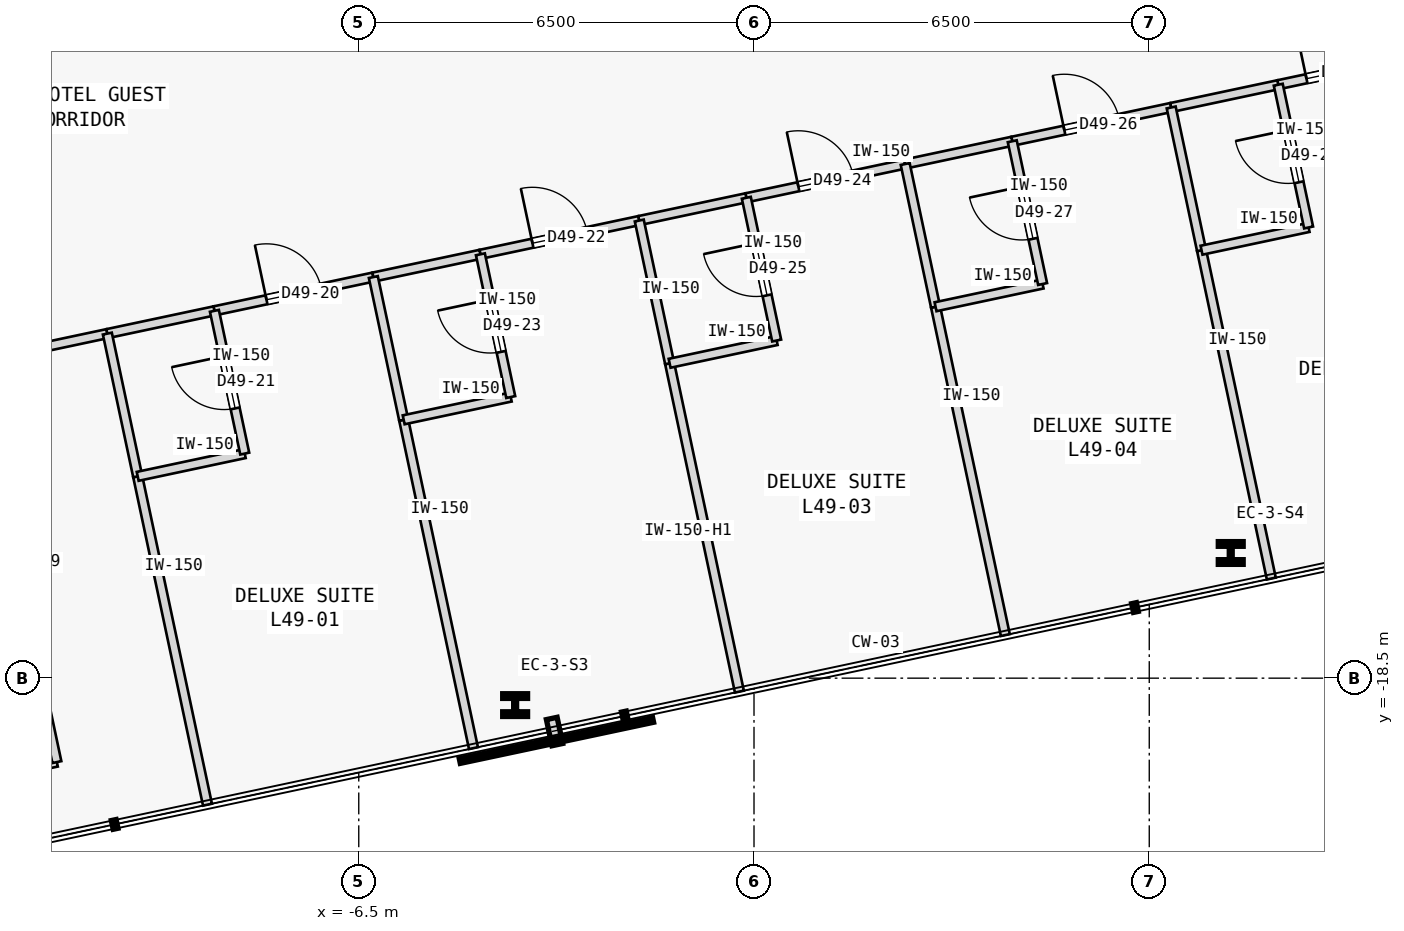
"""IFC4 building model, lengths in metres.
Left out: names, types, materials, properties, quantities, classifications, styles, units other than length and angle.
Written with IfcOpenShell. Run it as: python <this file> out.ifc"""

import sys

from ifc_helpers import new_model, si_unit, direction, frame, frame_2d, origin, origin_2d, place, context, subcontext, project, spatial, rectangle, i_section, extrude, element, fill, save


model = new_model("IFC4")
c1 = context("Model", 3, precision=1e-05, world=origin(), true_north=direction((0.0, 1.0)))
c2 = subcontext(c1, "Body", "Model", "MODEL_VIEW")
j1 = project(units=[si_unit("LENGTHUNIT", "METRE"), si_unit("PLANEANGLEUNIT", "RADIAN")], contexts=[c1])
p1 = place(None, origin())
s1 = spatial("IfcSite", under=j1, at=p1, CompositionType="ELEMENT")
p2 = place(p1, origin())
s2 = spatial("IfcBuilding", under=s1, at=p2, CompositionType="ELEMENT")
p3 = place(p2, frame((0.0, 0.0, 188.8)))
s3 = spatial("IfcBuildingStorey", under=s2, at=p3, CompositionType="ELEMENT", Elevation=188.8)
for number, where, z_axis, x_axis in (
    (1, (-3.928, -18.943, 0.0), (0.0, 0.0, 1.0), (1.0, 0.0, 0.0)),
    (2, (7.84, -16.441, 0.0), (0.0, 0.0, 1.0), (1.0, 0.0, 0.0)),
):
    element("IfcColumn", number, at=place(p3, frame(where, z_axis=z_axis, x_axis=x_axis)), inside=s3, PredefinedType="COLUMN", context=c2, shape_type="SweptSolid", body=[
        extrude(i_section(OverallWidth=0.409, OverallDepth=0.374, WebThickness=0.048, FlangeThickness=0.077, FilletRadius=0.015, at=origin_2d()), origin(), (0.0, 0.0, 1.0), 3.4),
    ])
p4 = place(p3, frame((-13.274, -20.265, 0.0), z_axis=(0.0, 0.0, 1.0), x_axis=(0.978160192495, 0.207852442415, 0.0)))
e3 = element("IfcWall", 3, at=p4, inside=s3, PredefinedType="PARTITIONING", context=c2, shape_type="SweptSolid", body=[
    extrude(rectangle(XDim=1.85, YDim=0.15, at=frame_2d((0.925, 0.0))), origin(), (0.0, 0.0, 1.0), 3.175),
])
p5 = place(p3, frame((-11.465, -19.88, 0.0), z_axis=(0.0, 0.0, 1.0), x_axis=(-0.207916109912, 0.978146661416, 0.0)))
e4 = element("IfcWall", 4, at=p5, inside=s3, PredefinedType="PARTITIONING", context=c2, shape_type="SweptSolid", body=[
    extrude(rectangle(XDim=6.72, YDim=0.15, at=frame_2d((3.36, 0.0))), origin(), (0.0, 0.0, 1.0), 3.175),
])
p6 = place(p5, frame((2.9, 0.0, 0.0)))
e5 = element("IfcOpeningElement", 5, at=p6, cuts=e4, PredefinedType="OPENING", context=c2, shape_type="SweptSolid", body=[
    extrude(rectangle(XDim=0.92, YDim=2.15, at=frame_2d((0.46, 1.075))), frame((0.0, 0.085, 0.0), z_axis=(0.0, -1.0, 0.0), x_axis=(1.0, 0.0, 0.0)), (0.0, 0.0, 1.0), 0.17),
])
p7 = place(p3, frame((-12.862, -13.307, 0.0), z_axis=(0.0, 0.0, 1.0), x_axis=(0.978150947903, 0.207895943, 0.0)))
e6 = element("IfcWall", 6, at=p7, inside=s3, PredefinedType="PARTITIONING", context=c2, shape_type="SweptSolid", body=[
    extrude(rectangle(XDim=2.277, YDim=0.15, at=frame_2d((1.139, 0.0))), origin(), (0.0, 0.0, 1.0), 3.175),
])
p8 = place(p3, frame((-8.874, -12.459, 0.0), z_axis=(0.0, 0.0, 1.0), x_axis=(0.978136784457, 0.207962570894, 0.0)))
e7 = element("IfcWall", 7, at=p8, inside=s3, PredefinedType="PARTITIONING", context=c2, shape_type="SweptSolid", body=[
    extrude(rectangle(XDim=2.672, YDim=0.15, at=frame_2d((1.336, 0.0))), origin(), (0.0, 0.0, 1.0), 3.175),
])
p9 = place(p8, frame((0.876, 0.0, 0.0)))
e8 = element("IfcOpeningElement", 8, at=p9, cuts=e7, PredefinedType="OPENING", context=c2, shape_type="SweptSolid", body=[
    extrude(rectangle(XDim=0.92, YDim=2.15, at=frame_2d((0.46, 1.075))), frame((0.0, 0.085, 0.0), z_axis=(0.0, -1.0, 0.0), x_axis=(1.0, 0.0, 0.0)), (0.0, 0.0, 1.0), 0.17),
])
p10 = place(p3, frame((-10.635, -12.834, 0.0), z_axis=(0.0, 0.0, 1.0), x_axis=(0.978146440129, 0.207917150959, 0.0)))
e9 = element("IfcWall", 9, at=p10, inside=s3, PredefinedType="PARTITIONING", context=c2, shape_type="SweptSolid", body=[
    extrude(rectangle(XDim=1.8, YDim=0.15, at=frame_2d((0.9, 0.0))), origin(), (0.0, 0.0, 1.0), 3.175),
])
p11 = place(p3, frame((-4.5, -11.53, 0.0), z_axis=(0.0, 0.0, 1.0), x_axis=(0.978139565144, 0.207949491702, 0.0)))
e10 = element("IfcWall", 10, at=p11, inside=s3, PredefinedType="PARTITIONING", context=c2, shape_type="SweptSolid", body=[
    extrude(rectangle(XDim=2.671, YDim=0.15, at=frame_2d((1.335, 0.0))), origin(), (0.0, 0.0, 1.0), 3.175),
])
p12 = place(p11, frame((0.875, 0.0, 0.0)))
e11 = element("IfcOpeningElement", 11, at=p12, cuts=e10, PredefinedType="OPENING", context=c2, shape_type="SweptSolid", body=[
    extrude(rectangle(XDim=0.92, YDim=2.15, at=frame_2d((0.46, 1.075))), frame((0.0, 0.085, 0.0), z_axis=(0.0, -1.0, 0.0), x_axis=(1.0, 0.0, 0.0)), (0.0, 0.0, 1.0), 0.17),
])
p13 = place(p3, frame((-6.26, -11.904, 0.0), z_axis=(0.0, 0.0, 1.0), x_axis=(0.978174015353, 0.207787380965, 0.0)))
e12 = element("IfcWall", 12, at=p13, inside=s3, PredefinedType="PARTITIONING", context=c2, shape_type="SweptSolid", body=[
    extrude(rectangle(XDim=1.8, YDim=0.15, at=frame_2d((0.9, 0.0))), origin(), (0.0, 0.0, 1.0), 3.175),
])
p14 = place(p3, frame((-0.126, -10.6, 0.0), z_axis=(0.0, 0.0, 1.0), x_axis=(0.978158153975, 0.207862035524, 0.0)))
e13 = element("IfcWall", 13, at=p14, inside=s3, PredefinedType="PARTITIONING", context=c2, shape_type="SweptSolid", body=[
    extrude(rectangle(XDim=2.671, YDim=0.15, at=frame_2d((1.335, 0.0))), origin(), (0.0, 0.0, 1.0), 3.175),
])
p15 = place(p14, frame((0.875, 0.0, 0.0)))
e14 = element("IfcOpeningElement", 14, at=p15, cuts=e13, PredefinedType="OPENING", context=c2, shape_type="SweptSolid", body=[
    extrude(rectangle(XDim=0.92, YDim=2.15, at=frame_2d((0.46, 1.075))), frame((0.0, 0.085, 0.0), z_axis=(0.0, -1.0, 0.0), x_axis=(1.0, 0.0, 0.0)), (0.0, 0.0, 1.0), 0.17),
])
p16 = place(p3, frame((-1.887, -10.974, 0.0), z_axis=(0.0, 0.0, 1.0), x_axis=(0.978146440129, 0.207917150959, 0.0)))
e15 = element("IfcWall", 15, at=p16, inside=s3, PredefinedType="PARTITIONING", context=c2, shape_type="SweptSolid", body=[
    extrude(rectangle(XDim=1.8, YDim=0.15, at=frame_2d((0.9, 0.0))), origin(), (0.0, 0.0, 1.0), 3.175),
])
p17 = place(p3, frame((4.247, -9.67, 0.0), z_axis=(0.0, 0.0, 1.0), x_axis=(0.978155367406, 0.207875148141, 0.0)))
e16 = element("IfcWall", 16, at=p17, inside=s3, PredefinedType="PARTITIONING", context=c2, shape_type="SweptSolid", body=[
    extrude(rectangle(XDim=2.672, YDim=0.15, at=frame_2d((1.336, 0.0))), origin(), (0.0, 0.0, 1.0), 3.175),
])
p18 = place(p17, frame((0.876, 0.0, 0.0)))
e17 = element("IfcOpeningElement", 17, at=p18, cuts=e16, PredefinedType="OPENING", context=c2, shape_type="SweptSolid", body=[
    extrude(rectangle(XDim=0.92, YDim=2.15, at=frame_2d((0.46, 1.075))), frame((0.0, 0.085, 0.0), z_axis=(0.0, -1.0, 0.0), x_axis=(1.0, 0.0, 0.0)), (0.0, 0.0, 1.0), 0.17),
])
p19 = place(p3, frame((2.486, -10.045, 0.0), z_axis=(0.0, 0.0, 1.0), x_axis=(0.978118849246, 0.208046909975, 0.0)))
e18 = element("IfcWall", 18, at=p19, inside=s3, PredefinedType="PARTITIONING", context=c2, shape_type="SweptSolid", body=[
    extrude(rectangle(XDim=1.8, YDim=0.15, at=frame_2d((0.9, 0.0))), origin(), (0.0, 0.0, 1.0), 3.175),
])
p20 = place(p3, frame((8.621, -8.741, 0.0), z_axis=(0.0, 0.0, 1.0), x_axis=(0.978139565144, 0.207949491702, 0.0)))
e19 = element("IfcWall", 19, at=p20, inside=s3, PredefinedType="PARTITIONING", context=c2, shape_type="SweptSolid", body=[
    extrude(rectangle(XDim=2.671, YDim=0.15, at=frame_2d((1.335, 0.0))), origin(), (0.0, 0.0, 1.0), 3.175),
])
p21 = place(p20, frame((0.475, 0.0, 0.0)))
e20 = element("IfcOpeningElement", 20, at=p21, cuts=e19, PredefinedType="OPENING", context=c2, shape_type="SweptSolid", body=[
    extrude(rectangle(XDim=0.92, YDim=2.15, at=frame_2d((0.46, 1.075))), frame((0.0, 0.085, 0.0), z_axis=(0.0, -1.0, 0.0), x_axis=(1.0, 0.0, 0.0)), (0.0, 0.0, 1.0), 0.17),
])
p22 = place(p3, frame((6.861, -9.115, 0.0), z_axis=(0.0, 0.0, 1.0), x_axis=(0.978146440129, 0.207917150959, 0.0)))
e21 = element("IfcWall", 21, at=p22, inside=s3, PredefinedType="PARTITIONING", context=c2, shape_type="SweptSolid", body=[
    extrude(rectangle(XDim=1.8, YDim=0.15, at=frame_2d((0.9, 0.0))), origin(), (0.0, 0.0, 1.0), 3.175),
])
p23 = place(p3, frame((-8.988, -20.581, 0.0), z_axis=(0.0, 0.0, 1.0), x_axis=(-0.20791588359, 0.978146709523, 0.0)))
e22 = element("IfcWall", 22, at=p23, inside=s3, PredefinedType="PARTITIONING", context=c2, shape_type="SweptSolid", body=[
    extrude(rectangle(XDim=5.52, YDim=0.15, at=frame_2d((2.76, 0.0))), origin(), (0.0, 0.0, 1.0), 3.175),
])
p24 = place(p3, frame((-10.135, -15.181, 0.0), z_axis=(0.0, 0.0, 1.0), x_axis=(-0.207937840262, 0.978142042133, 0.0)))
e23 = element("IfcWall", 23, at=p24, inside=s3, PredefinedType="PARTITIONING", context=c2, shape_type="SweptSolid", body=[
    extrude(rectangle(XDim=2.4, YDim=0.15, at=frame_2d((1.2, 0.0))), origin(), (0.0, 0.0, 1.0), 3.175),
])
p25 = place(p3, frame((-10.135, -15.181, 0.0), z_axis=(0.0, 0.0, 1.0), x_axis=(0.978140575842, 0.207944737591, 0.0)))
e24 = element("IfcWall", 24, at=p25, inside=s3, PredefinedType="PARTITIONING", context=c2, shape_type="SweptSolid", body=[
    extrude(rectangle(XDim=1.8, YDim=0.15, at=frame_2d((0.9, 0.0))), origin(), (0.0, 0.0, 1.0), 3.175),
])
p26 = place(p3, frame((-8.375, -14.807, 0.0), z_axis=(0.0, 0.0, 1.0), x_axis=(-0.207840504985, 0.978162729042, 0.0)))
e25 = element("IfcWall", 25, at=p26, inside=s3, PredefinedType="PARTITIONING", context=c2, shape_type="SweptSolid", body=[
    extrude(rectangle(XDim=2.4, YDim=0.15, at=frame_2d((1.2, 0.0))), origin(), (0.0, 0.0, 1.0), 3.175),
])
p27 = place(p26, frame((0.76, 0.0, 0.0)))
e26 = element("IfcOpeningElement", 26, at=p27, cuts=e25, PredefinedType="OPENING", context=c2, shape_type="SweptSolid", body=[
    extrude(rectangle(XDim=0.88, YDim=2.15, at=frame_2d((0.44, 1.075))), frame((0.0, 0.085, 0.0), z_axis=(0.0, -1.0, 0.0), x_axis=(1.0, 0.0, 0.0)), (0.0, 0.0, 1.0), 0.17),
])
p28 = place(p3, frame((-4.614, -19.651, 0.0), z_axis=(0.0, 0.0, 1.0), x_axis=(-0.20791588359, 0.978146709523, 0.0)))
e27 = element("IfcWall", 27, at=p28, inside=s3, PredefinedType="PARTITIONING", context=c2, shape_type="SweptSolid", body=[
    extrude(rectangle(XDim=5.52, YDim=0.15, at=frame_2d((2.76, 0.0))), origin(), (0.0, 0.0, 1.0), 3.175),
])
p29 = place(p3, frame((-5.761, -14.251, 0.0), z_axis=(0.0, 0.0, 1.0), x_axis=(-0.207917150959, 0.978146440129, 0.0)))
e28 = element("IfcWall", 28, at=p29, inside=s3, PredefinedType="PARTITIONING", context=c2, shape_type="SweptSolid", body=[
    extrude(rectangle(XDim=2.4, YDim=0.15, at=frame_2d((1.2, 0.0))), origin(), (0.0, 0.0, 1.0), 3.175),
])
p30 = place(p3, frame((-5.761, -14.251, 0.0), z_axis=(0.0, 0.0, 1.0), x_axis=(0.978146440129, 0.207917150959, 0.0)))
e29 = element("IfcWall", 29, at=p30, inside=s3, PredefinedType="PARTITIONING", context=c2, shape_type="SweptSolid", body=[
    extrude(rectangle(XDim=1.8, YDim=0.15, at=frame_2d((0.9, 0.0))), origin(), (0.0, 0.0, 1.0), 3.175),
])
p31 = place(p3, frame((-4.0, -13.877, 0.0), z_axis=(0.0, 0.0, 1.0), x_axis=(-0.207937840262, 0.978142042133, 0.0)))
e30 = element("IfcWall", 30, at=p31, inside=s3, PredefinedType="PARTITIONING", context=c2, shape_type="SweptSolid", body=[
    extrude(rectangle(XDim=2.4, YDim=0.15, at=frame_2d((1.2, 0.0))), origin(), (0.0, 0.0, 1.0), 3.175),
])
p32 = place(p31, frame((0.76, 0.0, 0.0)))
e31 = element("IfcOpeningElement", 31, at=p32, cuts=e30, PredefinedType="OPENING", context=c2, shape_type="SweptSolid", body=[
    extrude(rectangle(XDim=0.88, YDim=2.15, at=frame_2d((0.44, 1.075))), frame((0.0, 0.085, 0.0), z_axis=(0.0, -1.0, 0.0), x_axis=(1.0, 0.0, 0.0)), (0.0, 0.0, 1.0), 0.17),
])
p33 = place(p3, frame((-0.24, -18.721, 0.0), z_axis=(0.0, 0.0, 1.0), x_axis=(-0.20792487872, 0.978144797466, 0.0)))
e32 = element("IfcWall", 32, at=p33, inside=s3, PredefinedType="PARTITIONING", context=c2, shape_type="SweptSolid", body=[
    extrude(rectangle(XDim=5.52, YDim=0.15, at=frame_2d((2.76, 0.0))), origin(), (0.0, 0.0, 1.0), 2.725),
])
p34 = place(p3, frame((-1.388, -13.322, 0.0), z_axis=(0.0, 0.0, 1.0), x_axis=(-0.207917150959, 0.978146440129, 0.0)))
e33 = element("IfcWall", 33, at=p34, inside=s3, PredefinedType="PARTITIONING", context=c2, shape_type="SweptSolid", body=[
    extrude(rectangle(XDim=2.4, YDim=0.15, at=frame_2d((1.2, 0.0))), origin(), (0.0, 0.0, 1.0), 3.175),
])
p35 = place(p3, frame((-1.388, -13.322, 0.0), z_axis=(0.0, 0.0, 1.0), x_axis=(0.978118849246, 0.208046909975, 0.0)))
e34 = element("IfcWall", 34, at=p35, inside=s3, PredefinedType="PARTITIONING", context=c2, shape_type="SweptSolid", body=[
    extrude(rectangle(XDim=1.8, YDim=0.15, at=frame_2d((0.9, 0.0))), origin(), (0.0, 0.0, 1.0), 3.175),
])
p36 = place(p3, frame((0.373, -12.948, 0.0), z_axis=(0.0, 0.0, 1.0), x_axis=(-0.207937840262, 0.978142042133, 0.0)))
e35 = element("IfcWall", 35, at=p36, inside=s3, PredefinedType="PARTITIONING", context=c2, shape_type="SweptSolid", body=[
    extrude(rectangle(XDim=2.4, YDim=0.15, at=frame_2d((1.2, 0.0))), origin(), (0.0, 0.0, 1.0), 3.175),
])
p37 = place(p36, frame((0.76, 0.0, 0.0)))
e36 = element("IfcOpeningElement", 36, at=p37, cuts=e35, PredefinedType="OPENING", context=c2, shape_type="SweptSolid", body=[
    extrude(rectangle(XDim=0.88, YDim=2.15, at=frame_2d((0.44, 1.075))), frame((0.0, 0.085, 0.0), z_axis=(0.0, -1.0, 0.0), x_axis=(1.0, 0.0, 0.0)), (0.0, 0.0, 1.0), 0.17),
])
p38 = place(p3, frame((4.133, -17.792, 0.0), z_axis=(0.0, 0.0, 1.0), x_axis=(-0.20791588359, 0.978146709523, 0.0)))
e37 = element("IfcWall", 37, at=p38, inside=s3, PredefinedType="PARTITIONING", context=c2, shape_type="SweptSolid", body=[
    extrude(rectangle(XDim=5.52, YDim=0.15, at=frame_2d((2.76, 0.0))), origin(), (0.0, 0.0, 1.0), 3.175),
])
p39 = place(p3, frame((2.985, -12.392, 0.0), z_axis=(0.0, 0.0, 1.0), x_axis=(-0.207937840262, 0.978142042133, 0.0)))
e38 = element("IfcWall", 38, at=p39, inside=s3, PredefinedType="PARTITIONING", context=c2, shape_type="SweptSolid", body=[
    extrude(rectangle(XDim=2.4, YDim=0.15, at=frame_2d((1.2, 0.0))), origin(), (0.0, 0.0, 1.0), 3.175),
])
p40 = place(p3, frame((2.985, -12.392, 0.0), z_axis=(0.0, 0.0, 1.0), x_axis=(0.978146440129, 0.207917150959, 0.0)))
e39 = element("IfcWall", 39, at=p40, inside=s3, PredefinedType="PARTITIONING", context=c2, shape_type="SweptSolid", body=[
    extrude(rectangle(XDim=1.8, YDim=0.15, at=frame_2d((0.9, 0.0))), origin(), (0.0, 0.0, 1.0), 3.175),
])
p41 = place(p3, frame((4.746, -12.018, 0.0), z_axis=(0.0, 0.0, 1.0), x_axis=(-0.207917150959, 0.978146440129, 0.0)))
e40 = element("IfcWall", 40, at=p41, inside=s3, PredefinedType="PARTITIONING", context=c2, shape_type="SweptSolid", body=[
    extrude(rectangle(XDim=2.4, YDim=0.15, at=frame_2d((1.2, 0.0))), origin(), (0.0, 0.0, 1.0), 3.175),
])
p42 = place(p41, frame((0.76, 0.0, 0.0)))
e41 = element("IfcOpeningElement", 41, at=p42, cuts=e40, PredefinedType="OPENING", context=c2, shape_type="SweptSolid", body=[
    extrude(rectangle(XDim=0.88, YDim=2.15, at=frame_2d((0.44, 1.075))), frame((0.0, 0.085, 0.0), z_axis=(0.0, -1.0, 0.0), x_axis=(1.0, 0.0, 0.0)), (0.0, 0.0, 1.0), 0.17),
])
p43 = place(p3, frame((8.507, -16.862, 0.0), z_axis=(0.0, 0.0, 1.0), x_axis=(-0.20791588359, 0.978146709523, 0.0)))
e42 = element("IfcWall", 42, at=p43, inside=s3, PredefinedType="PARTITIONING", context=c2, shape_type="SweptSolid", body=[
    extrude(rectangle(XDim=5.52, YDim=0.15, at=frame_2d((2.76, 0.0))), origin(), (0.0, 0.0, 1.0), 3.175),
])
p44 = place(p3, frame((7.36, -11.462, 0.0), z_axis=(0.0, 0.0, 1.0), x_axis=(-0.207937840262, 0.978142042133, 0.0)))
e43 = element("IfcWall", 43, at=p44, inside=s3, PredefinedType="PARTITIONING", context=c2, shape_type="SweptSolid", body=[
    extrude(rectangle(XDim=2.4, YDim=0.15, at=frame_2d((1.2, 0.0))), origin(), (0.0, 0.0, 1.0), 3.175),
])
p45 = place(p3, frame((7.36, -11.462, 0.0), z_axis=(0.0, 0.0, 1.0), x_axis=(0.978174015353, 0.207787380965, 0.0)))
e44 = element("IfcWall", 44, at=p45, inside=s3, PredefinedType="PARTITIONING", context=c2, shape_type="SweptSolid", body=[
    extrude(rectangle(XDim=1.8, YDim=0.15, at=frame_2d((0.9, 0.0))), origin(), (0.0, 0.0, 1.0), 3.175),
])
p46 = place(p3, frame((9.12, -11.088, 0.0), z_axis=(0.0, 0.0, 1.0), x_axis=(-0.207917150959, 0.978146440129, 0.0)))
e45 = element("IfcWall", 45, at=p46, inside=s3, PredefinedType="PARTITIONING", context=c2, shape_type="SweptSolid", body=[
    extrude(rectangle(XDim=2.4, YDim=0.15, at=frame_2d((1.2, 0.0))), origin(), (0.0, 0.0, 1.0), 3.175),
])
p47 = place(p46, frame((0.76, 0.0, 0.0)))
e46 = element("IfcOpeningElement", 46, at=p47, cuts=e45, PredefinedType="OPENING", context=c2, shape_type="SweptSolid", body=[
    extrude(rectangle(XDim=0.88, YDim=2.15, at=frame_2d((0.44, 1.075))), frame((0.0, 0.085, 0.0), z_axis=(0.0, -1.0, 0.0), x_axis=(1.0, 0.0, 0.0)), (0.0, 0.0, 1.0), 0.17),
])
p48 = place(p9, origin())
e47 = element("IfcDoor", 47, at=p48, inside=s3, OperationType="SINGLE_SWING_LEFT", PredefinedType="DOOR", context=c2, shape_type="SweptSolid", body=[
    extrude(rectangle(XDim=0.92, YDim=2.15, at=frame_2d((0.46, 1.075))), frame((0.0, 0.025, 0.0), z_axis=(0.0, -1.0, 0.0), x_axis=(1.0, 0.0, 0.0)), (0.0, 0.0, 1.0), 0.05),
])
fill(e8, e47)
p49 = place(p27, origin())
e48 = element("IfcDoor", 48, at=p49, inside=s3, OperationType="SINGLE_SWING_RIGHT", PredefinedType="DOOR", context=c2, shape_type="SweptSolid", body=[
    extrude(rectangle(XDim=0.88, YDim=2.15, at=frame_2d((0.44, 1.075))), frame((0.0, 0.025, 0.0), z_axis=(0.0, -1.0, 0.0), x_axis=(1.0, 0.0, 0.0)), (0.0, 0.0, 1.0), 0.05),
])
fill(e26, e48)
p50 = place(p12, origin())
e49 = element("IfcDoor", 49, at=p50, inside=s3, OperationType="SINGLE_SWING_LEFT", PredefinedType="DOOR", context=c2, shape_type="SweptSolid", body=[
    extrude(rectangle(XDim=0.92, YDim=2.15, at=frame_2d((0.46, 1.075))), frame((0.0, 0.025, 0.0), z_axis=(0.0, -1.0, 0.0), x_axis=(1.0, 0.0, 0.0)), (0.0, 0.0, 1.0), 0.05),
])
fill(e11, e49)
p51 = place(p32, origin())
e50 = element("IfcDoor", 50, at=p51, inside=s3, OperationType="SINGLE_SWING_RIGHT", PredefinedType="DOOR", context=c2, shape_type="SweptSolid", body=[
    extrude(rectangle(XDim=0.88, YDim=2.15, at=frame_2d((0.44, 1.075))), frame((0.0, 0.025, 0.0), z_axis=(0.0, -1.0, 0.0), x_axis=(1.0, 0.0, 0.0)), (0.0, 0.0, 1.0), 0.05),
])
fill(e31, e50)
p52 = place(p15, origin())
e51 = element("IfcDoor", 51, at=p52, inside=s3, OperationType="SINGLE_SWING_LEFT", PredefinedType="DOOR", context=c2, shape_type="SweptSolid", body=[
    extrude(rectangle(XDim=0.92, YDim=2.15, at=frame_2d((0.46, 1.075))), frame((0.0, 0.025, 0.0), z_axis=(0.0, -1.0, 0.0), x_axis=(1.0, 0.0, 0.0)), (0.0, 0.0, 1.0), 0.05),
])
fill(e14, e51)
p53 = place(p37, origin())
e52 = element("IfcDoor", 52, at=p53, inside=s3, OperationType="SINGLE_SWING_RIGHT", PredefinedType="DOOR", context=c2, shape_type="SweptSolid", body=[
    extrude(rectangle(XDim=0.88, YDim=2.15, at=frame_2d((0.44, 1.075))), frame((0.0, 0.025, 0.0), z_axis=(0.0, -1.0, 0.0), x_axis=(1.0, 0.0, 0.0)), (0.0, 0.0, 1.0), 0.05),
])
fill(e36, e52)
p54 = place(p18, origin())
e53 = element("IfcDoor", 53, at=p54, inside=s3, OperationType="SINGLE_SWING_LEFT", PredefinedType="DOOR", context=c2, shape_type="SweptSolid", body=[
    extrude(rectangle(XDim=0.92, YDim=2.15, at=frame_2d((0.46, 1.075))), frame((0.0, 0.025, 0.0), z_axis=(0.0, -1.0, 0.0), x_axis=(1.0, 0.0, 0.0)), (0.0, 0.0, 1.0), 0.05),
])
fill(e17, e53)
p55 = place(p42, origin())
e54 = element("IfcDoor", 54, at=p55, inside=s3, OperationType="SINGLE_SWING_RIGHT", PredefinedType="DOOR", context=c2, shape_type="SweptSolid", body=[
    extrude(rectangle(XDim=0.88, YDim=2.15, at=frame_2d((0.44, 1.075))), frame((0.0, 0.025, 0.0), z_axis=(0.0, -1.0, 0.0), x_axis=(1.0, 0.0, 0.0)), (0.0, 0.0, 1.0), 0.05),
])
fill(e41, e54)
p56 = place(p21, origin())
e55 = element("IfcDoor", 55, at=p56, inside=s3, OperationType="SINGLE_SWING_LEFT", PredefinedType="DOOR", context=c2, shape_type="SweptSolid", body=[
    extrude(rectangle(XDim=0.92, YDim=2.15, at=frame_2d((0.46, 1.075))), frame((0.0, 0.025, 0.0), z_axis=(0.0, -1.0, 0.0), x_axis=(1.0, 0.0, 0.0)), (0.0, 0.0, 1.0), 0.05),
])
fill(e20, e55)
p57 = place(p47, origin())
e56 = element("IfcDoor", 56, at=p57, inside=s3, OperationType="SINGLE_SWING_RIGHT", PredefinedType="DOOR", context=c2, shape_type="SweptSolid", body=[
    extrude(rectangle(XDim=0.88, YDim=2.15, at=frame_2d((0.44, 1.075))), frame((0.0, 0.025, 0.0), z_axis=(0.0, -1.0, 0.0), x_axis=(1.0, 0.0, 0.0)), (0.0, 0.0, 1.0), 0.05),
])
fill(e46, e56)
save(model, sys.argv[1])
